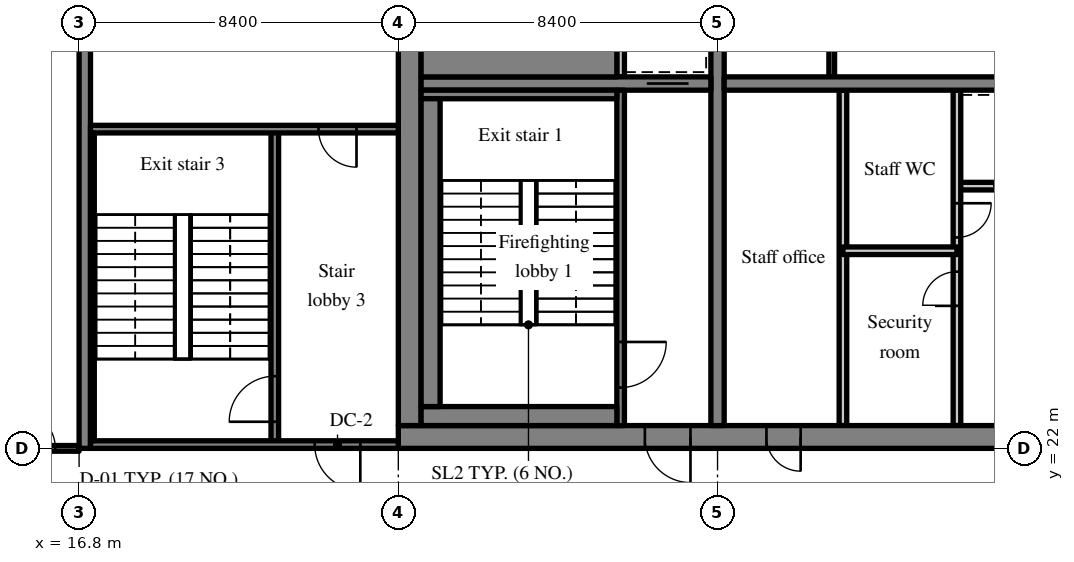
"""IFC4 building model, lengths in metres.
Left out: names, types, materials, properties, quantities, classifications, styles, units other than length and angle.
Written with IfcOpenShell. Run it as: python <this file> out.ifc"""

import sys

from ifc_helpers import new_model, si_unit, direction, frame, frame_2d, origin, place, context, subcontext, project, spatial, rectangle, extrude, source, transform, mapped, element, fill, save


model = new_model("IFC4")
c1 = context("Model", 3, precision=1e-05, world=origin(), true_north=direction((0.0, 1.0)))
c2 = subcontext(c1, "Body", "Model", "MODEL_VIEW")
j1 = project(units=[si_unit("LENGTHUNIT", "METRE"), si_unit("PLANEANGLEUNIT", "RADIAN")], contexts=[c1])
p1 = place(None, origin())
s1 = spatial("IfcSite", under=j1, at=p1, CompositionType="ELEMENT")
p2 = place(p1, origin())
s2 = spatial("IfcBuilding", under=s1, at=p2, CompositionType="ELEMENT")
p3 = place(p2, frame((0.0, 0.0, 237.4)))
s3 = spatial("IfcBuildingStorey", under=s2, at=p3, CompositionType="ELEMENT", Elevation=237.4)
m1 = source(origin(), c2, "Body", "SweptSolid", [
    extrude(rectangle(XDim=50.4, YDim=0.6, at=frame_2d((25.2, 0.0))), origin(), (0.0, 0.0, 1.0), 3.62),
])
p4 = place(p3, frame((25.2, 22.3, 0.0), z_axis=(0.0, 0.0, 1.0), x_axis=(1.0, 0.0, 0.0)))
e1 = element("IfcWall", 1, at=p4, inside=s3, PredefinedType="SHEAR", context=c2, shape_type="MappedRepresentation", body=[
    mapped(m1, transform((0.0, 0.0, 0.0), scale=1.0)),
])
m2 = source(origin(), c2, "Body", "SweptSolid", [
    extrude(rectangle(XDim=1.8, YDim=2.1, at=frame_2d((0.9, 1.05))), frame((0.0, 0.31, 0.0), z_axis=(0.0, -1.0, 0.0), x_axis=(1.0, 0.0, 0.0)), (0.0, 0.0, 1.0), 0.62),
])
p5 = place(p4, frame((15.9, 0.0, 0.0)))
e2 = element("IfcOpeningElement", 2, at=p5, cuts=e1, PredefinedType="OPENING", context=c2, shape_type="MappedRepresentation", body=[
    mapped(m2, transform((0.0, 0.0, 0.0), scale=1.0)),
])
m3 = source(origin(), c2, "Body", "SweptSolid", [
    extrude(rectangle(XDim=0.9, YDim=2.1, at=frame_2d((0.45, 1.05))), frame((0.0, 0.31, 0.0), z_axis=(0.0, -1.0, 0.0), x_axis=(1.0, 0.0, 0.0)), (0.0, 0.0, 1.0), 0.62),
])
p6 = place(p4, frame((9.687, 0.0, 0.0)))
e3 = element("IfcOpeningElement", 3, at=p6, cuts=e1, PredefinedType="OPENING", context=c2, shape_type="MappedRepresentation", body=[
    mapped(m3, transform((0.0, 0.0, 0.0), scale=1.0)),
])
p7 = place(p4, frame((21.513, 0.0, 0.0)))
e4 = element("IfcOpeningElement", 4, at=p7, cuts=e1, PredefinedType="OPENING", context=c2, shape_type="MappedRepresentation", body=[
    mapped(m3, transform((0.0, 0.0, 0.0), scale=1.0)),
])
p8 = place(p4, frame((32.7, 0.0, 0.0)))
e5 = element("IfcOpeningElement", 5, at=p8, cuts=e1, PredefinedType="OPENING", context=c2, shape_type="MappedRepresentation", body=[
    mapped(m2, transform((0.0, 0.0, 0.0), scale=1.0)),
])
m4 = source(origin(), c2, "Body", "SweptSolid", [
    extrude(rectangle(XDim=1.2, YDim=2.1, at=frame_2d((0.6, 1.05))), frame((0.0, 0.31, 0.0), z_axis=(0.0, -1.0, 0.0), x_axis=(1.0, 0.0, 0.0)), (0.0, 0.0, 1.0), 0.62),
])
p9 = place(p4, frame((6.488, 0.0, 0.0)))
e6 = element("IfcOpeningElement", 6, at=p9, cuts=e1, PredefinedType="OPENING", context=c2, shape_type="MappedRepresentation", body=[
    mapped(m4, transform((0.0, 0.0, 0.0), scale=1.0)),
])
p10 = place(p4, frame((47.925, 0.0, 0.0)))
e7 = element("IfcOpeningElement", 7, at=p10, cuts=e1, PredefinedType="OPENING", context=c2, shape_type="MappedRepresentation", body=[
    mapped(m4, transform((0.0, 0.0, 0.0), scale=1.0)),
])
m5 = source(origin(), c2, "Body", "SweptSolid", [
    extrude(rectangle(XDim=18.8, YDim=0.6, at=frame_2d((9.4, 0.0))), origin(), (0.0, 0.0, 1.0), 3.62),
])
p11 = place(p3, frame((25.5, 22.6, 0.0), z_axis=(0.0, 0.0, 1.0), x_axis=(0.0, 1.0, 0.0)))
e8 = element("IfcWall", 8, at=p11, inside=s3, PredefinedType="SHEAR", context=c2, shape_type="MappedRepresentation", body=[
    mapped(m5, transform((0.0, 0.0, 0.0), scale=1.0)),
])
m6 = source(origin(), c2, "Body", "SweptSolid", [
    extrude(rectangle(XDim=18.8, YDim=0.35, at=frame_2d((9.4, 0.0))), origin(), (0.0, 0.0, 1.0), 3.62),
])
p12 = place(p3, frame((33.6, 22.6, 0.0), z_axis=(0.0, 0.0, 1.0), x_axis=(0.0, 1.0, 0.0)))
e9 = element("IfcWall", 9, at=p12, inside=s3, PredefinedType="SHEAR", context=c2, shape_type="MappedRepresentation", body=[
    mapped(m6, transform((0.0, 0.0, 0.0), scale=1.0)),
])
m7 = source(origin(), c2, "Body", "SweptSolid", [
    extrude(rectangle(XDim=1.1, YDim=2.1, at=frame_2d((0.55, 1.05))), frame((0.0, 0.185, 0.0), z_axis=(0.0, -1.0, 0.0), x_axis=(1.0, 0.0, 0.0)), (0.0, 0.0, 1.0), 0.37),
])
p13 = place(p12, frame((12.85, 0.0, 0.0)))
e10 = element("IfcOpeningElement", 10, at=p13, cuts=e9, PredefinedType="OPENING", context=c2, shape_type="MappedRepresentation", body=[
    mapped(m7, transform((0.0, 0.0, 0.0), scale=1.0)),
])
m8 = source(origin(), c2, "Body", "SweptSolid", [
    extrude(rectangle(XDim=7.625, YDim=0.35, at=frame_2d((3.812, 0.0))), origin(), (0.0, 0.0, 1.0), 3.62),
])
p14 = place(p3, frame((25.8, 31.6, 0.0), z_axis=(0.0, 0.0, 1.0), x_axis=(1.0, 0.0, 0.0)))
e11 = element("IfcWall", 11, at=p14, inside=s3, PredefinedType="SHEAR", context=c2, shape_type="MappedRepresentation", body=[
    mapped(m8, transform((0.0, 0.0, 0.0), scale=1.0)),
])
p15 = place(p14, frame((5.938, 0.0, 0.0)))
e12 = element("IfcOpeningElement", 12, at=p15, cuts=e11, PredefinedType="OPENING", context=c2, shape_type="MappedRepresentation", body=[
    mapped(m7, transform((0.0, 0.0, 0.0), scale=1.0)),
])
m9 = source(origin(), c2, "Body", "SweptSolid", [
    extrude(rectangle(XDim=16.45, YDim=0.35, at=frame_2d((8.225, 0.0))), origin(), (0.0, 0.0, 1.0), 3.62),
])
p16 = place(p3, frame((33.775, 31.6, 0.0), z_axis=(0.0, 0.0, 1.0), x_axis=(1.0, 0.0, 0.0)))
e13 = element("IfcWall", 13, at=p16, inside=s3, PredefinedType="SHEAR", context=c2, shape_type="MappedRepresentation", body=[
    mapped(m9, transform((0.0, 0.0, 0.0), scale=1.0)),
])
m10 = source(origin(), c2, "Body", "SweptSolid", [
    extrude(rectangle(XDim=1.0, YDim=2.1, at=frame_2d((0.5, 1.05))), frame((0.0, 0.185, 0.0), z_axis=(0.0, -1.0, 0.0), x_axis=(1.0, 0.0, 0.0)), (0.0, 0.0, 1.0), 0.37),
])
p17 = place(p16, frame((14.837, 0.0, 0.0)))
e14 = element("IfcOpeningElement", 14, at=p17, cuts=e13, PredefinedType="OPENING", context=c2, shape_type="MappedRepresentation", body=[
    mapped(m10, transform((0.0, 0.0, 0.0), scale=1.0)),
])
m11 = source(origin(), c2, "Body", "SweptSolid", [
    extrude(rectangle(XDim=18.4, YDim=0.3, at=frame_2d((9.2, 0.0))), origin(), (0.0, 0.0, 1.0), 3.62),
])
p18 = place(p3, frame((16.95, 22.0, 0.0), z_axis=(0.0, 0.0, 1.0), x_axis=(0.0, 1.0, 0.0)))
e15 = element("IfcWall", 15, at=p18, inside=s3, PredefinedType="SHEAR", context=c2, shape_type="MappedRepresentation", body=[
    mapped(m11, transform((0.0, 0.0, 0.0), scale=1.0)),
])
m12 = source(origin(), c2, "Body", "SweptSolid", [
    extrude(rectangle(XDim=6.0, YDim=0.2, at=frame_2d((3.0, 0.0))), origin(), (0.0, 0.0, 1.0), 3.62),
])
p19 = place(p3, frame((39.9, 28.9, 0.0), z_axis=(0.0, 0.0, 1.0), x_axis=(1.0, 0.0, 0.0)))
e16 = element("IfcWall", 16, at=p19, inside=s3, PredefinedType="SOLIDWALL", context=c2, shape_type="MappedRepresentation", body=[
    mapped(m12, transform((0.0, 0.0, 0.0), scale=1.0)),
])
m13 = source(origin(), c2, "Body", "SweptSolid", [
    extrude(rectangle(XDim=1.1, YDim=2.1, at=frame_2d((0.55, 1.05))), frame((0.0, 0.11, 0.0), z_axis=(0.0, -1.0, 0.0), x_axis=(1.0, 0.0, 0.0)), (0.0, 0.0, 1.0), 0.22),
])
p20 = place(p19, frame((0.95, 0.0, 0.0)))
e17 = element("IfcOpeningElement", 17, at=p20, cuts=e16, PredefinedType="OPENING", context=c2, shape_type="MappedRepresentation", body=[
    mapped(m13, transform((0.0, 0.0, 0.0), scale=1.0)),
])
p21 = place(p19, frame((3.95, 0.0, 0.0)))
e18 = element("IfcOpeningElement", 18, at=p21, cuts=e16, PredefinedType="OPENING", context=c2, shape_type="MappedRepresentation", body=[
    mapped(m13, transform((0.0, 0.0, 0.0), scale=1.0)),
])
m14 = source(origin(), c2, "Body", "SweptSolid", [
    extrude(rectangle(XDim=8.825, YDim=0.2, at=frame_2d((4.413, 0.0))), origin(), (0.0, 0.0, 1.0), 3.62),
])
p22 = place(p3, frame((39.9, 22.6, 0.0), z_axis=(0.0, 0.0, 1.0), x_axis=(0.0, 1.0, 0.0)))
e19 = element("IfcWall", 19, at=p22, inside=s3, PredefinedType="PARTITIONING", context=c2, shape_type="MappedRepresentation", body=[
    mapped(m14, transform((0.0, 0.0, 0.0), scale=1.0)),
])
m15 = source(origin(), c2, "Body", "SweptSolid", [
    extrude(rectangle(XDim=0.9, YDim=2.1, at=frame_2d((0.45, 1.05))), frame((0.0, 0.11, 0.0), z_axis=(0.0, -1.0, 0.0), x_axis=(1.0, 0.0, 0.0)), (0.0, 0.0, 1.0), 0.22),
])
p23 = place(p22, frame((3.15, 0.0, 0.0)))
e20 = element("IfcOpeningElement", 20, at=p23, cuts=e19, PredefinedType="OPENING", context=c2, shape_type="MappedRepresentation", body=[
    mapped(m15, transform((0.0, 0.0, 0.0), scale=1.0)),
])
p24 = place(p22, frame((4.95, 0.0, 0.0)))
e21 = element("IfcOpeningElement", 21, at=p24, cuts=e19, PredefinedType="OPENING", context=c2, shape_type="MappedRepresentation", body=[
    mapped(m15, transform((0.0, 0.0, 0.0), scale=1.0)),
])
p25 = place(p3, frame((36.9, 22.6, 0.0), z_axis=(0.0, 0.0, 1.0), x_axis=(0.0, 1.0, 0.0)))
e22 = element("IfcWall", 22, at=p25, inside=s3, PredefinedType="PARTITIONING", context=c2, shape_type="MappedRepresentation", body=[
    mapped(m14, transform((0.0, 0.0, 0.0), scale=1.0)),
])
m16 = source(origin(), c2, "Body", "SweptSolid", [
    extrude(rectangle(XDim=3.0, YDim=0.2, at=frame_2d((1.5, 0.0))), origin(), (0.0, 0.0, 1.0), 3.62),
])
p26 = place(p3, frame((36.9, 27.2, 0.0), z_axis=(0.0, 0.0, 1.0), x_axis=(1.0, 0.0, 0.0)))
e23 = element("IfcWall", 23, at=p26, inside=s3, PredefinedType="PARTITIONING", context=c2, shape_type="MappedRepresentation", body=[
    mapped(m16, transform((0.0, 0.0, 0.0), scale=1.0)),
])
m17 = source(origin(), c2, "Body", "SweptSolid", [
    extrude(rectangle(XDim=3.225, YDim=0.15, at=frame_2d((1.613, 0.0))), origin(), (0.0, 0.0, 1.0), 3.62),
])
p27 = place(p3, frame((36.605, 31.775, 0.0), z_axis=(0.0, 0.0, 1.0), x_axis=(0.0, 1.0, 0.0)))
e24 = element("IfcWall", 24, at=p27, inside=s3, PredefinedType="PARTITIONING", context=c2, shape_type="MappedRepresentation", body=[
    mapped(m17, transform((0.0, 0.0, 0.0), scale=1.0)),
])
m18 = source(origin(), c2, "Body", "SweptSolid", [
    extrude(rectangle(XDim=8.825, YDim=0.2, at=frame_2d((4.413, 0.0))), origin(), (0.0, 0.0, 1.0), 3.62),
])
p28 = place(p3, frame((31.05, 22.6, 0.0), z_axis=(0.0, 0.0, 1.0), x_axis=(0.0, 1.0, 0.0)))
e25 = element("IfcWall", 25, at=p28, inside=s3, PredefinedType="SOLIDWALL", context=c2, shape_type="MappedRepresentation", body=[
    mapped(m18, transform((0.0, 0.0, 0.0), scale=1.0)),
])
m19 = source(origin(), c2, "Body", "SweptSolid", [
    extrude(rectangle(XDim=1.2, YDim=2.1, at=frame_2d((0.6, 1.05))), frame((0.0, 0.11, 0.0), z_axis=(0.0, -1.0, 0.0), x_axis=(1.0, 0.0, 0.0)), (0.0, 0.0, 1.0), 0.22),
])
p29 = place(p28, frame((1.0, 0.0, 0.0)))
e26 = element("IfcOpeningElement", 26, at=p29, cuts=e25, PredefinedType="OPENING", context=c2, shape_type="MappedRepresentation", body=[
    mapped(m19, transform((0.0, 0.0, 0.0), scale=1.0)),
])
m20 = source(origin(), c2, "Body", "SweptSolid", [
    extrude(rectangle(XDim=1.825, YDim=0.2, at=frame_2d((0.913, 0.0))), origin(), (0.0, 0.0, 1.0), 3.62),
])
p30 = place(p3, frame((31.05, 31.775, 0.0), z_axis=(0.0, 0.0, 1.0), x_axis=(0.0, 1.0, 0.0)))
e27 = element("IfcWall", 27, at=p30, inside=s3, PredefinedType="SOLIDWALL", context=c2, shape_type="MappedRepresentation", body=[
    mapped(m20, transform((0.0, 0.0, 0.0), scale=1.0)),
])
m21 = source(origin(), c2, "Body", "SweptSolid", [
    extrude(rectangle(XDim=8.3, YDim=0.2, at=frame_2d((4.15, 0.0))), origin(), (0.0, 0.0, 1.0), 3.62),
])
p31 = place(p3, frame((21.95, 22.1, 0.0), z_axis=(0.0, 0.0, 1.0), x_axis=(0.0, 1.0, 0.0)))
e28 = element("IfcWall", 28, at=p31, inside=s3, PredefinedType="SOLIDWALL", context=c2, shape_type="MappedRepresentation", body=[
    mapped(m21, transform((0.0, 0.0, 0.0), scale=1.0)),
])
p32 = place(p31, frame((0.6, 0.0, 0.0)))
e29 = element("IfcOpeningElement", 29, at=p32, cuts=e28, PredefinedType="OPENING", context=c2, shape_type="MappedRepresentation", body=[
    mapped(m19, transform((0.0, 0.0, 0.0), scale=1.0)),
])
m22 = source(origin(), c2, "Body", "SweptSolid", [
    extrude(rectangle(XDim=8.1, YDim=0.2, at=frame_2d((4.05, 0.0))), origin(), (0.0, 0.0, 1.0), 3.62),
])
p33 = place(p3, frame((17.1, 22.1, 0.0), z_axis=(0.0, 0.0, 1.0), x_axis=(1.0, 0.0, 0.0)))
e30 = element("IfcWall", 30, at=p33, inside=s3, PredefinedType="SOLIDWALL", context=c2, shape_type="MappedRepresentation", body=[
    mapped(m22, transform((0.0, 0.0, 0.0), scale=1.0)),
])
p34 = place(p33, frame((5.9, 0.0, 0.0)))
e31 = element("IfcOpeningElement", 31, at=p34, cuts=e30, PredefinedType="OPENING", context=c2, shape_type="MappedRepresentation", body=[
    mapped(m19, transform((0.0, 0.0, 0.0), scale=1.0)),
])
p35 = place(p3, frame((17.1, 30.4, 0.0), z_axis=(0.0, 0.0, 1.0), x_axis=(1.0, 0.0, 0.0)))
e32 = element("IfcWall", 32, at=p35, inside=s3, PredefinedType="SOLIDWALL", context=c2, shape_type="MappedRepresentation", body=[
    mapped(m22, transform((0.0, 0.0, 0.0), scale=1.0)),
])
m23 = source(origin(), c2, "Body", "SweptSolid", [
    extrude(rectangle(XDim=1.0, YDim=2.1, at=frame_2d((0.5, 1.05))), frame((0.0, 0.11, 0.0), z_axis=(0.0, -1.0, 0.0), x_axis=(1.0, 0.0, 0.0)), (0.0, 0.0, 1.0), 0.22),
])
p36 = place(p35, frame((6.0, 0.0, 0.0)))
e33 = element("IfcOpeningElement", 33, at=p36, cuts=e32, PredefinedType="OPENING", context=c2, shape_type="MappedRepresentation", body=[
    mapped(m23, transform((0.0, 0.0, 0.0), scale=1.0)),
])
m24 = source(origin(), c2, "Body", "SweptSolid", [
    extrude(rectangle(XDim=5.15, YDim=0.5, at=frame_2d((2.575, 0.0))), origin(), (0.0, 0.0, 1.0), 3.62),
])
p37 = place(p3, frame((25.8, 22.85, 0.0), z_axis=(0.0, 0.0, 1.0), x_axis=(1.0, 0.0, 0.0)))
e34 = element("IfcWall", 34, at=p37, inside=s3, PredefinedType="SOLIDWALL", context=c2, shape_type="MappedRepresentation", body=[
    mapped(m24, transform((0.0, 0.0, 0.0), scale=1.0)),
])
m25 = source(origin(), c2, "Body", "SweptSolid", [
    extrude(rectangle(XDim=5.15, YDim=0.225, at=frame_2d((2.575, 0.0))), origin(), (0.0, 0.0, 1.0), 3.62),
])
p38 = place(p3, frame((25.8, 31.312, 0.0), z_axis=(0.0, 0.0, 1.0), x_axis=(1.0, 0.0, 0.0)))
e35 = element("IfcWall", 35, at=p38, inside=s3, PredefinedType="SOLIDWALL", context=c2, shape_type="MappedRepresentation", body=[
    mapped(m25, transform((0.0, 0.0, 0.0), scale=1.0)),
])
m26 = source(origin(), c2, "Body", "SweptSolid", [
    extrude(rectangle(XDim=8.1, YDim=0.5, at=frame_2d((4.05, 0.0))), origin(), (0.0, 0.0, 1.0), 3.62),
])
p39 = place(p3, frame((26.05, 23.1, 0.0), z_axis=(0.0, 0.0, 1.0), x_axis=(0.0, 1.0, 0.0)))
e36 = element("IfcWall", 36, at=p39, inside=s3, PredefinedType="SOLIDWALL", context=c2, shape_type="MappedRepresentation", body=[
    mapped(m26, transform((0.0, 0.0, 0.0), scale=1.0)),
])
m27 = source(origin(), c2, "Body", "SweptSolid", [
    extrude(rectangle(XDim=8.1, YDim=0.1, at=frame_2d((4.05, 0.0))), origin(), (0.0, 0.0, 1.0), 3.62),
])
p40 = place(p3, frame((17.15, 22.2, 0.0), z_axis=(0.0, 0.0, 1.0), x_axis=(0.0, 1.0, 0.0)))
e37 = element("IfcWall", 37, at=p40, inside=s3, PredefinedType="SOLIDWALL", context=c2, shape_type="MappedRepresentation", body=[
    mapped(m27, transform((0.0, 0.0, 0.0), scale=1.0)),
])
m28 = source(origin(), c2, "Body", "SweptSolid", [
    extrude(rectangle(XDim=5.15, YDim=1.025, at=frame_2d((2.575, 0.0))), origin(), (0.0, 0.0, 1.0), 3.62),
])
p41 = place(p3, frame((25.8, 32.287, 0.0), z_axis=(0.0, 0.0, 1.0), x_axis=(1.0, 0.0, 0.0)))
e38 = element("IfcWall", 38, at=p41, inside=s3, PredefinedType="SOLIDWALL", context=c2, shape_type="MappedRepresentation", body=[
    mapped(m28, transform((0.0, 0.0, 0.0), scale=1.0)),
])
m29 = source(origin(), c2, "Body", "SweptSolid", [
    extrude(rectangle(XDim=1.9, YDim=0.15, at=frame_2d((0.95, 0.0))), origin(), (0.0, 0.0, 1.0), 2.92),
])
p42 = place(p3, frame((14.9, 22.0, 0.0), z_axis=(0.0, 0.0, 1.0), x_axis=(1.0, 0.0, 0.0)))
e39 = element("IfcWall", 39, at=p42, inside=s3, PredefinedType="PARTITIONING", context=c2, shape_type="MappedRepresentation", body=[
    mapped(m29, transform((0.0, 0.0, 0.0), scale=1.0)),
])
m30 = source(origin(), c2, "Body", "SweptSolid", [
    extrude(rectangle(XDim=1.0, YDim=2.1, at=frame_2d((0.5, 1.05))), frame((0.0, 0.085, 0.0), z_axis=(0.0, -1.0, 0.0), x_axis=(1.0, 0.0, 0.0)), (0.0, 0.0, 1.0), 0.17),
])
p43 = place(p42, frame((0.275, 0.0, 0.0)))
e40 = element("IfcOpeningElement", 40, at=p43, cuts=e39, PredefinedType="OPENING", context=c2, shape_type="MappedRepresentation", body=[
    mapped(m30, transform((0.0, 0.0, 0.0), scale=1.0)),
])
m31 = source(origin(), c2, "Body", "SweptSolid", [
    extrude(rectangle(XDim=1.1, YDim=2.1, at=frame_2d((0.55, 1.05))), frame((0.0, 0.025, 0.0), z_axis=(0.0, -1.0, 0.0), x_axis=(1.0, 0.0, 0.0)), (0.0, 0.0, 1.0), 0.05),
])
p44 = place(p20, origin())
e41 = element("IfcDoor", 41, at=p44, inside=s3, OperationType="SLIDING_TO_LEFT", PredefinedType="DOOR", context=c2, shape_type="MappedRepresentation", body=[
    mapped(m31, transform((0.0, 0.0, 0.0), scale=1.0)),
])
fill(e17, e41)
m32 = source(origin(), c2, "Body", "SweptSolid", [
    extrude(rectangle(XDim=0.9, YDim=2.1, at=frame_2d((0.45, 1.05))), frame((0.0, 0.225, 0.0), z_axis=(0.0, -1.0, 0.0), x_axis=(1.0, 0.0, 0.0)), (0.0, 0.0, 1.0), 0.05),
])
p45 = place(p6, origin())
e42 = element("IfcDoor", 42, at=p45, inside=s3, OperationType="SINGLE_SWING_RIGHT", PredefinedType="DOOR", context=c2, shape_type="MappedRepresentation", body=[
    mapped(m32, transform((0.0, 0.0, 0.0), scale=1.0)),
])
fill(e3, e42)
m33 = source(origin(), c2, "Body", "SweptSolid", [
    extrude(rectangle(XDim=0.9, YDim=2.1, at=frame_2d((0.45, 1.05))), frame((0.0, 0.025, 0.0), z_axis=(0.0, -1.0, 0.0), x_axis=(1.0, 0.0, 0.0)), (0.0, 0.0, 1.0), 0.05),
])
p46 = place(p23, origin())
e43 = element("IfcDoor", 43, at=p46, inside=s3, OperationType="SINGLE_SWING_LEFT", PredefinedType="DOOR", context=c2, shape_type="MappedRepresentation", body=[
    mapped(m33, transform((0.0, 0.0, 0.0), scale=1.0)),
])
fill(e20, e43)
p47 = place(p24, origin())
e44 = element("IfcDoor", 44, at=p47, inside=s3, OperationType="SINGLE_SWING_RIGHT", PredefinedType="DOOR", context=c2, shape_type="MappedRepresentation", body=[
    mapped(m33, transform((0.0, 0.0, 0.0), scale=1.0)),
])
fill(e21, e44)
m34 = source(origin(), c2, "Body", "SweptSolid", [
    extrude(rectangle(XDim=1.2, YDim=2.1, at=frame_2d((0.6, 1.05))), frame((0.0, 0.025, 0.0), z_axis=(0.0, -1.0, 0.0), x_axis=(1.0, 0.0, 0.0)), (0.0, 0.0, 1.0), 0.05),
])
p48 = place(p29, origin())
e45 = element("IfcDoor", 45, at=p48, inside=s3, OperationType="SINGLE_SWING_RIGHT", PredefinedType="DOOR", context=c2, shape_type="MappedRepresentation", body=[
    mapped(m34, transform((0.0, 0.0, 0.0), scale=1.0)),
])
fill(e26, e45)
m35 = source(origin(), c2, "Body", "SweptSolid", [
    extrude(rectangle(XDim=1.2, YDim=2.1, at=frame_2d((0.6, 1.05))), frame((0.0, 0.225, 0.0), z_axis=(0.0, -1.0, 0.0), x_axis=(1.0, 0.0, 0.0)), (0.0, 0.0, 1.0), 0.05),
])
p49 = place(p9, origin())
e46 = element("IfcDoor", 46, at=p49, inside=s3, OperationType="SINGLE_SWING_RIGHT", PredefinedType="DOOR", context=c2, shape_type="MappedRepresentation", body=[
    mapped(m35, transform((0.0, 0.0, 0.0), scale=1.0)),
])
fill(e6, e46)
p50 = place(p15, origin())
e47 = element("IfcDoor", 47, at=p50, inside=s3, OperationType="SLIDING_TO_RIGHT", PredefinedType="DOOR", context=c2, shape_type="MappedRepresentation", body=[
    mapped(m31, transform((0.0, 0.0, 0.0), scale=1.0)),
])
fill(e12, e47)
p51 = place(p32, origin())
e48 = element("IfcDoor", 48, at=p51, inside=s3, OperationType="SINGLE_SWING_LEFT", PredefinedType="DOOR", context=c2, shape_type="MappedRepresentation", body=[
    mapped(m34, transform((0.0, 0.0, 0.0), scale=1.0)),
])
fill(e29, e48)
p52 = place(p34, origin())
e49 = element("IfcDoor", 49, at=p52, inside=s3, OperationType="SINGLE_SWING_RIGHT", PredefinedType="DOOR", context=c2, shape_type="MappedRepresentation", body=[
    mapped(m34, transform((0.0, 0.0, 0.0), scale=1.0)),
])
fill(e31, e49)
m36 = source(origin(), c2, "Body", "SweptSolid", [
    extrude(rectangle(XDim=1.0, YDim=2.1, at=frame_2d((0.5, 1.05))), frame((0.0, 0.025, 0.0), z_axis=(0.0, -1.0, 0.0), x_axis=(1.0, 0.0, 0.0)), (0.0, 0.0, 1.0), 0.05),
])
p53 = place(p36, origin())
e50 = element("IfcDoor", 50, at=p53, inside=s3, OperationType="SINGLE_SWING_RIGHT", PredefinedType="DOOR", context=c2, shape_type="MappedRepresentation", body=[
    mapped(m36, transform((0.0, 0.0, 0.0), scale=1.0)),
])
fill(e33, e50)
p54 = place(p43, origin())
e51 = element("IfcDoor", 51, at=p54, inside=s3, OperationType="SINGLE_SWING_LEFT", PredefinedType="DOOR", context=c2, shape_type="MappedRepresentation", body=[
    mapped(m36, transform((0.0, 0.0, 0.0), scale=1.0)),
])
fill(e40, e51)
save(model, sys.argv[1])
